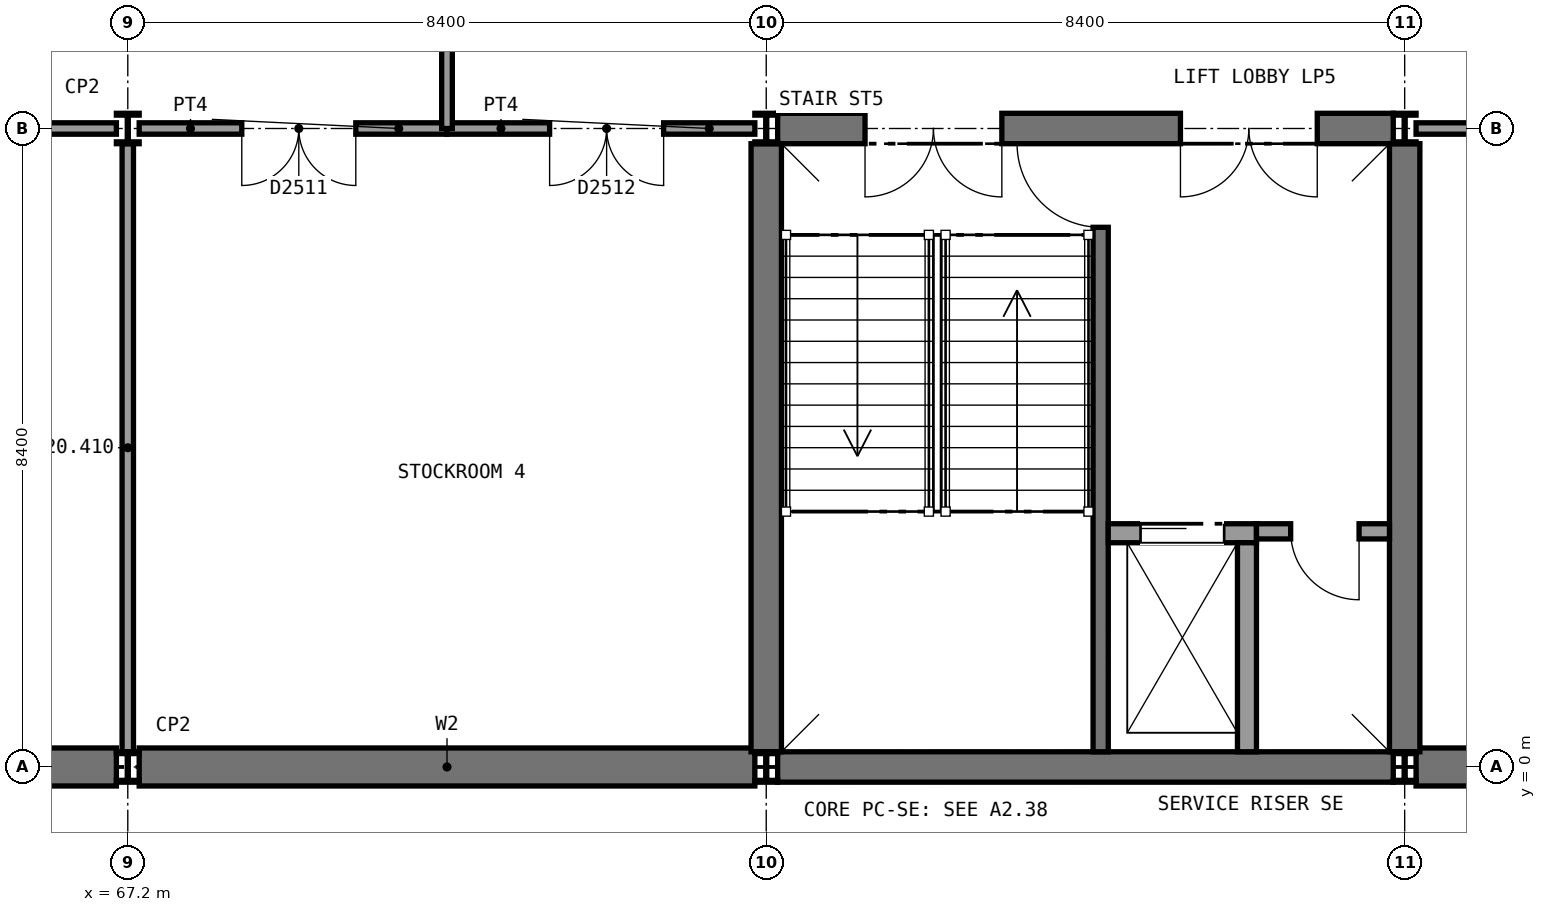
"""IFC4 building model, lengths in metres.
Left out: names, types, materials, properties, quantities, classifications, styles, units other than length and angle.
Written with IfcOpenShell. Run it as: python <this file> out.ifc"""

import sys

from ifc_helpers import new_model, si_unit, direction, frame, frame_2d, origin, origin_2d, place, context, subcontext, project, spatial, rectangle, i_section, extrude, element, fill, save


model = new_model("IFC4")
c1 = context("Model", 3, precision=1e-05, world=origin(), true_north=direction((0.0, 1.0)))
c2 = subcontext(c1, "Body", "Model", "MODEL_VIEW")
j1 = project(units=[si_unit("LENGTHUNIT", "METRE"), si_unit("PLANEANGLEUNIT", "RADIAN")], contexts=[c1])
p1 = place(None, origin())
s1 = spatial("IfcSite", under=j1, at=p1, CompositionType="ELEMENT")
p2 = place(p1, origin())
s2 = spatial("IfcBuilding", under=s1, at=p2, CompositionType="ELEMENT")
p3 = place(p2, frame((0.0, 0.0, 16.2)))
s3 = spatial("IfcBuildingStorey", under=s2, at=p3, CompositionType="ELEMENT", Elevation=16.2)
p4 = place(p3, frame((58.95, 0.0, 0.0), z_axis=(0.0, 0.0, 1.0), x_axis=(1.0, 0.0, 0.0)))
e1 = element("IfcWall", 1, at=p4, inside=s3, PredefinedType="SHEAR", context=c2, shape_type="SweptSolid", body=[
    extrude(rectangle(XDim=8.1, YDim=0.5, at=frame_2d((4.05, 0.0))), origin(), (0.0, 0.0, 1.0), 4.65),
])
p5 = place(p3, frame((67.35, 0.0, 0.0), z_axis=(0.0, 0.0, 1.0), x_axis=(1.0, 0.0, 0.0)))
e2 = element("IfcWall", 2, at=p5, inside=s3, PredefinedType="SHEAR", context=c2, shape_type="SweptSolid", body=[
    extrude(rectangle(XDim=8.1, YDim=0.5, at=frame_2d((4.05, 0.0))), origin(), (0.0, 0.0, 1.0), 4.65),
])
p6 = place(p3, frame((84.15, 0.0, 0.0), z_axis=(0.0, 0.0, 1.0), x_axis=(1.0, 0.0, 0.0)))
e3 = element("IfcWall", 3, at=p6, inside=s3, PredefinedType="SHEAR", context=c2, shape_type="SweptSolid", body=[
    extrude(rectangle(XDim=8.1, YDim=0.5, at=frame_2d((4.05, 0.0))), origin(), (0.0, 0.0, 1.0), 4.65),
])
p7 = place(p3, frame((75.75, 0.0, 0.0), z_axis=(0.0, 0.0, 1.0), x_axis=(1.0, 0.0, 0.0)))
e4 = element("IfcWall", 4, at=p7, inside=s3, PredefinedType="SHEAR", context=c2, shape_type="SweptSolid", body=[
    extrude(rectangle(XDim=8.1, YDim=0.4, at=frame_2d((4.05, 0.0))), origin(), (0.0, 0.0, 1.0), 4.65),
])
p8 = place(p3, frame((75.75, 8.4, 0.0), z_axis=(0.0, 0.0, 1.0), x_axis=(1.0, 0.0, 0.0)))
e5 = element("IfcWall", 5, at=p8, inside=s3, PredefinedType="SHEAR", context=c2, shape_type="SweptSolid", body=[
    extrude(rectangle(XDim=8.1, YDim=0.4, at=frame_2d((4.05, 0.0))), origin(), (0.0, 0.0, 1.0), 4.65),
])
p9 = place(p8, frame((1.15, 0.0, 0.0)))
e6 = element("IfcOpeningElement", 6, at=p9, cuts=e5, PredefinedType="OPENING", context=c2, shape_type="SweptSolid", body=[
    extrude(rectangle(XDim=1.8, YDim=2.1, at=frame_2d((0.9, 1.05))), frame((0.0, 0.21, 0.0), z_axis=(0.0, -1.0, 0.0), x_axis=(1.0, 0.0, 0.0)), (0.0, 0.0, 1.0), 0.42),
])
p10 = place(p8, frame((5.3, 0.0, 0.0)))
e7 = element("IfcOpeningElement", 7, at=p10, cuts=e5, PredefinedType="OPENING", context=c2, shape_type="SweptSolid", body=[
    extrude(rectangle(XDim=1.8, YDim=2.1, at=frame_2d((0.9, 1.05))), frame((0.0, 0.21, 0.0), z_axis=(0.0, -1.0, 0.0), x_axis=(1.0, 0.0, 0.0)), (0.0, 0.0, 1.0), 0.42),
])
for number, where, z_axis, x_axis in (
    (8, (75.6, 0.2, 0.0), (0.0, 0.0, 1.0), (0.0, 1.0, 0.0)),
    (9, (84.0, 0.2, 0.0), (0.0, 0.0, 1.0), (0.0, 1.0, 0.0)),
):
    element("IfcWall", number, at=place(p3, frame(where, z_axis=z_axis, x_axis=x_axis)), inside=s3, PredefinedType="SHEAR", context=c2, shape_type="SweptSolid", body=[
        extrude(rectangle(XDim=8.0, YDim=0.4, at=frame_2d((4.0, 0.0))), origin(), (0.0, 0.0, 1.0), 4.65),
    ])
for number, where, z_axis, x_axis in (
    (10, (67.2, 0.0, 0.0), (0.0, 0.0, 1.0), (1.0, 0.0, 0.0)),
    (11, (67.2, 8.4, 0.0), (0.0, 0.0, 1.0), (1.0, 0.0, 0.0)),
    (12, (75.6, 0.0, 0.0), (0.0, 0.0, 1.0), (1.0, 0.0, 0.0)),
    (13, (75.6, 8.4, 0.0), (0.0, 0.0, 1.0), (1.0, 0.0, 0.0)),
    (14, (84.0, 0.0, 0.0), (0.0, 0.0, 1.0), (1.0, 0.0, 0.0)),
    (15, (84.0, 8.4, 0.0), (0.0, 0.0, 1.0), (1.0, 0.0, 0.0)),
):
    element("IfcColumn", number, at=place(p3, frame(where, z_axis=z_axis, x_axis=x_axis)), inside=s3, PredefinedType="COLUMN", context=c2, shape_type="SweptSolid", body=[
        extrude(i_section(OverallWidth=0.3, OverallDepth=0.4, WebThickness=0.013, FlangeThickness=0.024, FilletRadius=0.027, at=origin_2d()), origin(), (0.0, 0.0, 1.0), 4.8),
    ])
p11 = place(p3, frame((67.2, 0.2, 0.0), z_axis=(0.0, 0.0, 1.0), x_axis=(0.0, 1.0, 0.0)))
e16 = element("IfcWall", 16, at=p11, inside=s3, PredefinedType="SOLIDWALL", context=c2, shape_type="SweptSolid", body=[
    extrude(rectangle(XDim=8.0, YDim=0.15, at=frame_2d((4.0, 0.0))), origin(), (0.0, 0.0, 1.0), 4.21),
])
p12 = place(p3, frame((58.95, 8.4, 0.0), z_axis=(0.0, 0.0, 1.0), x_axis=(1.0, 0.0, 0.0)))
e17 = element("IfcWall", 17, at=p12, inside=s3, PredefinedType="SOLIDWALL", context=c2, shape_type="SweptSolid", body=[
    extrude(rectangle(XDim=8.1, YDim=0.15, at=frame_2d((4.05, 0.0))), origin(), (0.0, 0.0, 1.0), 4.32),
])
p13 = place(p12, frame((3.35, 0.0, 0.0)))
e18 = element("IfcOpeningElement", 18, at=p13, cuts=e17, PredefinedType="OPENING", context=c2, shape_type="SweptSolid", body=[
    extrude(rectangle(XDim=1.5, YDim=2.1, at=frame_2d((0.75, 1.05))), frame((0.0, 0.085, 0.0), z_axis=(0.0, -1.0, 0.0), x_axis=(1.0, 0.0, 0.0)), (0.0, 0.0, 1.0), 0.17),
])
p14 = place(p3, frame((67.35, 8.4, 0.0), z_axis=(0.0, 0.0, 1.0), x_axis=(1.0, 0.0, 0.0)))
e19 = element("IfcWall", 19, at=p14, inside=s3, PredefinedType="SOLIDWALL", context=c2, shape_type="SweptSolid", body=[
    extrude(rectangle(XDim=4.05, YDim=0.15, at=frame_2d((2.025, 0.0))), origin(), (0.0, 0.0, 1.0), 4.32),
])
p15 = place(p14, frame((1.35, 0.0, 0.0)))
e20 = element("IfcOpeningElement", 20, at=p15, cuts=e19, PredefinedType="OPENING", context=c2, shape_type="SweptSolid", body=[
    extrude(rectangle(XDim=1.5, YDim=2.1, at=frame_2d((0.75, 1.05))), frame((0.0, 0.085, 0.0), z_axis=(0.0, -1.0, 0.0), x_axis=(1.0, 0.0, 0.0)), (0.0, 0.0, 1.0), 0.17),
])
p16 = place(p3, frame((71.4, 8.4, 0.0), z_axis=(0.0, 0.0, 1.0), x_axis=(1.0, 0.0, 0.0)))
e21 = element("IfcWall", 21, at=p16, inside=s3, PredefinedType="SOLIDWALL", context=c2, shape_type="SweptSolid", body=[
    extrude(rectangle(XDim=4.05, YDim=0.15, at=frame_2d((2.025, 0.0))), origin(), (0.0, 0.0, 1.0), 4.32),
])
p17 = place(p16, frame((1.35, 0.0, 0.0)))
e22 = element("IfcOpeningElement", 22, at=p17, cuts=e21, PredefinedType="OPENING", context=c2, shape_type="SweptSolid", body=[
    extrude(rectangle(XDim=1.5, YDim=2.1, at=frame_2d((0.75, 1.05))), frame((0.0, 0.085, 0.0), z_axis=(0.0, -1.0, 0.0), x_axis=(1.0, 0.0, 0.0)), (0.0, 0.0, 1.0), 0.17),
])
p18 = place(p3, frame((84.15, 8.4, 0.0), z_axis=(0.0, 0.0, 1.0), x_axis=(1.0, 0.0, 0.0)))
e23 = element("IfcWall", 23, at=p18, inside=s3, PredefinedType="SOLIDWALL", context=c2, shape_type="SweptSolid", body=[
    extrude(rectangle(XDim=8.1, YDim=0.15, at=frame_2d((4.05, 0.0))), origin(), (0.0, 0.0, 1.0), 4.32),
])
p19 = place(p18, frame((3.35, 0.0, 0.0)))
e24 = element("IfcOpeningElement", 24, at=p19, cuts=e23, PredefinedType="OPENING", context=c2, shape_type="SweptSolid", body=[
    extrude(rectangle(XDim=1.5, YDim=2.1, at=frame_2d((0.75, 1.05))), frame((0.0, 0.085, 0.0), z_axis=(0.0, -1.0, 0.0), x_axis=(1.0, 0.0, 0.0)), (0.0, 0.0, 1.0), 0.17),
])
p20 = place(p3, frame((71.4, 8.4, 0.0), z_axis=(0.0, 0.0, 1.0), x_axis=(0.0, 1.0, 0.0)))
e25 = element("IfcWall", 25, at=p20, inside=s3, PredefinedType="PARTITIONING", context=c2, shape_type="SweptSolid", body=[
    extrude(rectangle(XDim=7.6, YDim=0.14, at=frame_2d((3.8, 0.0))), origin(), (0.0, 0.0, 1.0), 4.65),
])
p21 = place(p3, frame((80.0, 0.2, 0.0), z_axis=(0.0, 0.0, 1.0), x_axis=(0.0, 1.0, 0.0)))
e26 = element("IfcWall", 26, at=p21, inside=s3, PredefinedType="SHEAR", context=c2, shape_type="SweptSolid", body=[
    extrude(rectangle(XDim=8.0, YDim=0.2, at=frame_2d((4.0, 0.0))), origin(), (0.0, 0.0, 1.0), 4.65),
])
p22 = place(p21, frame((6.9, 0.0, 0.0)))
e27 = element("IfcOpeningElement", 27, at=p22, cuts=e26, PredefinedType="OPENING", context=c2, shape_type="SweptSolid", body=[
    extrude(rectangle(XDim=1.11, YDim=2.1, at=frame_2d((0.555, 1.05))), frame((0.0, 0.11, 0.0), z_axis=(0.0, -1.0, 0.0), x_axis=(1.0, 0.0, 0.0)), (0.0, 0.0, 1.0), 0.22),
])
p23 = place(p3, frame((80.1, 3.075, 0.0), z_axis=(0.0, 0.0, 1.0), x_axis=(1.0, 0.0, 0.0)))
e28 = element("IfcWall", 28, at=p23, inside=s3, PredefinedType="SOLIDWALL", context=c2, shape_type="SweptSolid", body=[
    extrude(rectangle(XDim=1.95, YDim=0.25, at=frame_2d((0.975, 0.0))), origin(), (0.0, 0.0, 1.0), 4.8),
])
p24 = place(p23, frame((0.425, 0.0, 0.0)))
e29 = element("IfcOpeningElement", 29, at=p24, cuts=e28, PredefinedType="OPENING", context=c2, shape_type="SweptSolid", body=[
    extrude(rectangle(XDim=1.1, YDim=2.1, at=frame_2d((0.55, 1.05))), frame((0.0, 0.135, 0.0), z_axis=(0.0, -1.0, 0.0), x_axis=(1.0, 0.0, 0.0)), (0.0, 0.0, 1.0), 0.27),
])
p25 = place(p3, frame((81.925, 0.2, 0.0), z_axis=(0.0, 0.0, 1.0), x_axis=(0.0, 1.0, 0.0)))
e30 = element("IfcWall", 30, at=p25, inside=s3, PredefinedType="SOLIDWALL", context=c2, shape_type="SweptSolid", body=[
    extrude(rectangle(XDim=2.75, YDim=0.25, at=frame_2d((1.375, 0.0))), origin(), (0.0, 0.0, 1.0), 4.8),
])
p26 = place(p3, frame((82.05, 3.1, 0.0), z_axis=(0.0, 0.0, 1.0), x_axis=(1.0, 0.0, 0.0)))
e31 = element("IfcWall", 31, at=p26, inside=s3, PredefinedType="PARTITIONING", context=c2, shape_type="SweptSolid", body=[
    extrude(rectangle(XDim=1.75, YDim=0.2, at=frame_2d((0.875, 0.0))), origin(), (0.0, 0.0, 1.0), 4.65),
])
p27 = place(p26, frame((0.45, 0.0, 0.0)))
e32 = element("IfcOpeningElement", 32, at=p27, cuts=e31, PredefinedType="OPENING", context=c2, shape_type="SweptSolid", body=[
    extrude(rectangle(XDim=0.9, YDim=2.1, at=frame_2d((0.45, 1.05))), frame((0.0, 0.11, 0.0), z_axis=(0.0, -1.0, 0.0), x_axis=(1.0, 0.0, 0.0)), (0.0, 0.0, 1.0), 0.22),
])
p28 = place(p15, frame((1.5, 0.0, 0.0), z_axis=(0.0, 0.0, 1.0), x_axis=(-1.0, 0.0, 0.0)))
e33 = element("IfcDoor", 33, at=p28, inside=s3, OperationType="DOUBLE_DOOR_SINGLE_SWING", PredefinedType="DOOR", context=c2, shape_type="SweptSolid", body=[
    extrude(rectangle(XDim=1.5, YDim=2.1, at=frame_2d((0.75, 1.05))), frame((0.0, 0.025, 0.0), z_axis=(0.0, -1.0, 0.0), x_axis=(1.0, 0.0, 0.0)), (0.0, 0.0, 1.0), 0.05),
])
fill(e20, e33)
p29 = place(p17, frame((1.5, 0.0, 0.0), z_axis=(0.0, 0.0, 1.0), x_axis=(-1.0, 0.0, 0.0)))
e34 = element("IfcDoor", 34, at=p29, inside=s3, OperationType="DOUBLE_DOOR_SINGLE_SWING", PredefinedType="DOOR", context=c2, shape_type="SweptSolid", body=[
    extrude(rectangle(XDim=1.5, YDim=2.1, at=frame_2d((0.75, 1.05))), frame((0.0, 0.025, 0.0), z_axis=(0.0, -1.0, 0.0), x_axis=(1.0, 0.0, 0.0)), (0.0, 0.0, 1.0), 0.05),
])
fill(e22, e34)
p30 = place(p22, origin())
e35 = element("IfcDoor", 35, at=p30, inside=s3, OperationType="SINGLE_SWING_RIGHT", PredefinedType="DOOR", context=c2, shape_type="SweptSolid", body=[
    extrude(rectangle(XDim=1.1, YDim=2.1, at=frame_2d((0.55, 1.05))), frame((0.0, 0.025, 0.0), z_axis=(0.0, -1.0, 0.0), x_axis=(1.0, 0.0, 0.0)), (0.0, 0.0, 1.0), 0.05),
])
fill(e27, e35)
p31 = place(p24, origin())
e36 = element("IfcDoor", 36, at=p31, inside=s3, OperationType="SLIDING_TO_LEFT", PredefinedType="DOOR", context=c2, shape_type="SweptSolid", body=[
    extrude(rectangle(XDim=1.1, YDim=2.1, at=frame_2d((0.55, 1.05))), frame((0.0, 0.025, 0.0), z_axis=(0.0, -1.0, 0.0), x_axis=(1.0, 0.0, 0.0)), (0.0, 0.0, 1.0), 0.05),
])
fill(e29, e36)
p32 = place(p27, frame((0.9, 0.0, 0.0), z_axis=(0.0, 0.0, 1.0), x_axis=(-1.0, 0.0, 0.0)))
e37 = element("IfcDoor", 37, at=p32, inside=s3, OperationType="SINGLE_SWING_LEFT", PredefinedType="DOOR", context=c2, shape_type="SweptSolid", body=[
    extrude(rectangle(XDim=0.9, YDim=2.1, at=frame_2d((0.45, 1.05))), frame((0.0, 0.025, 0.0), z_axis=(0.0, -1.0, 0.0), x_axis=(1.0, 0.0, 0.0)), (0.0, 0.0, 1.0), 0.05),
])
fill(e32, e37)
p33 = place(p9, frame((1.8, 0.0, 0.0), z_axis=(0.0, 0.0, 1.0), x_axis=(-1.0, 0.0, 0.0)))
e38 = element("IfcDoor", 38, at=p33, inside=s3, OperationType="DOUBLE_DOOR_SINGLE_SWING", PredefinedType="DOOR", context=c2, shape_type="SweptSolid", body=[
    extrude(rectangle(XDim=1.8, YDim=2.1, at=frame_2d((0.9, 1.05))), frame((0.0, 0.025, 0.0), z_axis=(0.0, -1.0, 0.0), x_axis=(1.0, 0.0, 0.0)), (0.0, 0.0, 1.0), 0.05),
])
fill(e6, e38)
p34 = place(p10, frame((1.8, 0.0, 0.0), z_axis=(0.0, 0.0, 1.0), x_axis=(-1.0, 0.0, 0.0)))
e39 = element("IfcDoor", 39, at=p34, inside=s3, OperationType="DOUBLE_DOOR_SINGLE_SWING", PredefinedType="DOOR", context=c2, shape_type="SweptSolid", body=[
    extrude(rectangle(XDim=1.8, YDim=2.1, at=frame_2d((0.9, 1.05))), frame((0.0, 0.025, 0.0), z_axis=(0.0, -1.0, 0.0), x_axis=(1.0, 0.0, 0.0)), (0.0, 0.0, 1.0), 0.05),
])
fill(e7, e39)
save(model, sys.argv[1])
